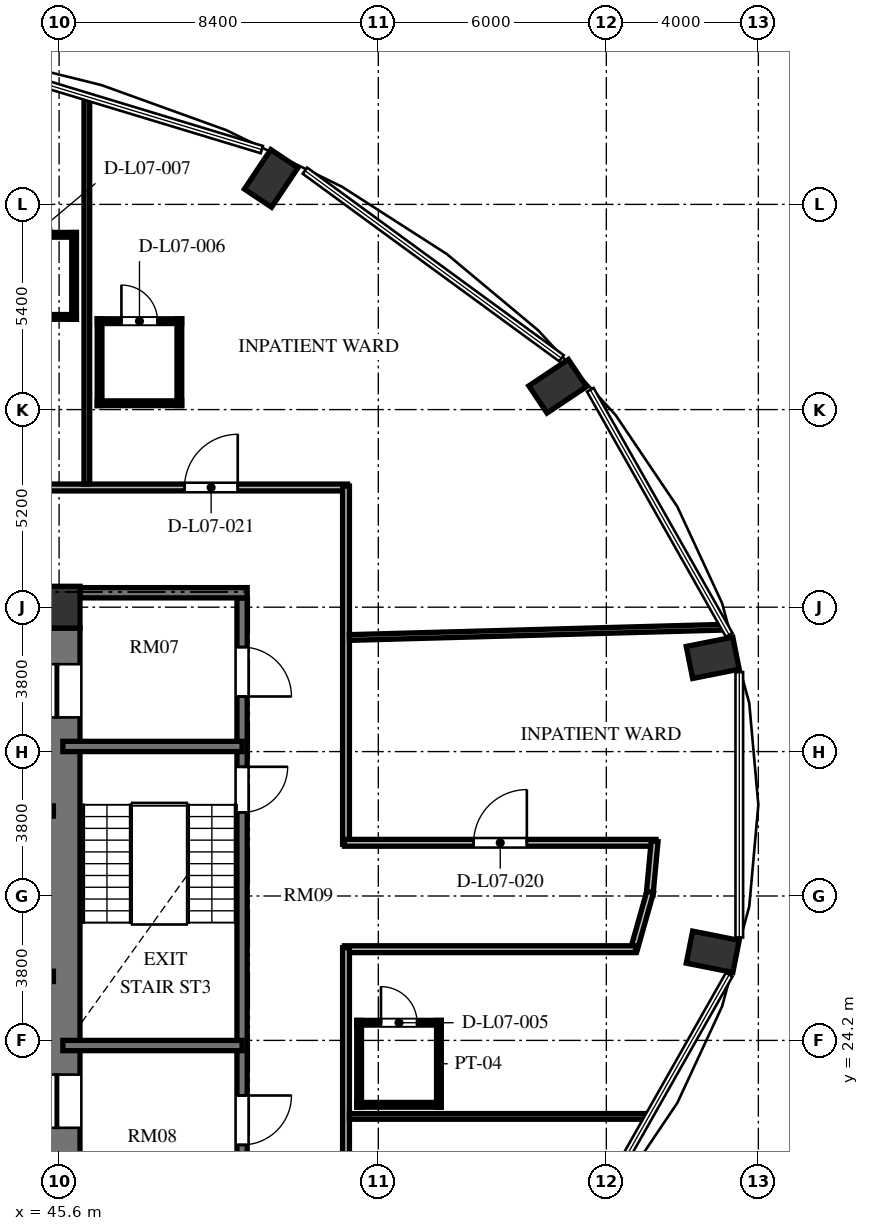
"""IFC4 building model, lengths in metres.
Left out: names, types, materials, properties, quantities, classifications, styles, units other than length and angle.
Written with IfcOpenShell. Run it as: python <this file> out.ifc"""

import sys

from ifc_helpers import new_model, si_unit, direction, frame, frame_2d, origin, origin_2d, place, context, subcontext, project, spatial, rectangle, extrude, element, fill, save


model = new_model("IFC4")
c1 = context("Model", 3, precision=1e-05, world=origin(), true_north=direction((0.0, 1.0)))
c2 = subcontext(c1, "Body", "Model", "MODEL_VIEW")
j1 = project(units=[si_unit("LENGTHUNIT", "METRE"), si_unit("PLANEANGLEUNIT", "RADIAN")], contexts=[c1])
p1 = place(None, origin())
s1 = spatial("IfcSite", under=j1, at=p1, CompositionType="ELEMENT")
p2 = place(p1, origin())
s2 = spatial("IfcBuilding", under=s1, at=p2, CompositionType="ELEMENT")
p3 = place(p2, frame((0.0, 0.0, 32.496)))
s3 = spatial("IfcBuildingStorey", under=s2, at=p3, CompositionType="ELEMENT", Elevation=32.496)
for number, where, z_axis, x_axis in (
    (1, (62.8, 26.532, 0.0), (0.0, 0.0, 1.0), (0.981, -0.195, 0.0)),
    (2, (62.8, 34.268, 0.0), (0.0, 0.0, 1.0), (0.981, 0.195, 0.0)),
    (3, (58.72, 41.414, 0.0), (0.0, 0.0, 1.0), (0.831, 0.556, 0.0)),
    (4, (51.181, 46.884, 0.0), (0.0, 0.0, 1.0), (0.556, 0.831, 0.0)),
):
    element("IfcColumn", number, at=place(p3, frame(where, z_axis=z_axis, x_axis=x_axis)), inside=s3, PredefinedType="COLUMN", context=c2, shape_type="SweptSolid", body=[
        extrude(rectangle(XDim=1.25, YDim=0.86, at=origin_2d()), origin(), (0.0, 0.0, 1.0), 3.648),
    ])
p4 = place(p3, frame((45.6, 35.6, 0.0), z_axis=(0.0, 0.0, 1.0), x_axis=(1.0, 0.0, 0.0)))
e5 = element("IfcColumn", 5, at=p4, inside=s3, PredefinedType="COLUMN", context=c2, shape_type="SweptSolid", body=[
    extrude(rectangle(XDim=1.1, YDim=1.1, at=origin_2d()), origin(), (0.0, 0.0, 1.0), 3.648),
])
p5 = place(p3, frame((45.7, 20.95, 0.0), z_axis=(0.0, 0.0, 1.0), x_axis=(0.0, 1.0, 0.0)))
e6 = element("IfcWall", 6, at=p5, inside=s3, PredefinedType="SHEAR", context=c2, shape_type="SweptSolid", body=[
    extrude(rectangle(XDim=14.1, YDim=0.9, at=frame_2d((7.05, 0.0))), origin(), (0.0, 0.0, 1.0), 3.648),
])
p6 = place(p5, frame((11.75, 0.0, 0.0)))
e7 = element("IfcOpeningElement", 7, at=p6, cuts=e6, PredefinedType="OPENING", context=c2, shape_type="SweptSolid", body=[
    extrude(rectangle(XDim=1.4, YDim=2.3, at=frame_2d((0.7, 1.15))), frame((0.0, 0.46, 0.0), z_axis=(0.0, -1.0, 0.0), x_axis=(1.0, 0.0, 0.0)), (0.0, 0.0, 1.0), 0.92),
])
p7 = place(p5, frame((0.95, 0.0, 0.0)))
e8 = element("IfcOpeningElement", 8, at=p7, cuts=e6, PredefinedType="OPENING", context=c2, shape_type="SweptSolid", body=[
    extrude(rectangle(XDim=1.4, YDim=2.3, at=frame_2d((0.7, 1.15))), frame((0.0, 0.46, 0.0), z_axis=(0.0, -1.0, 0.0), x_axis=(1.0, 0.0, 0.0)), (0.0, 0.0, 1.0), 0.92),
])
p8 = place(p3, frame((37.465, 30.235, 0.0), z_axis=(0.0, 0.0, 1.0), x_axis=(1.0, 0.0, 0.0)))
e9 = element("IfcWall", 9, at=p8, inside=s3, PredefinedType="SHEAR", context=c2, shape_type="SweptSolid", body=[
    extrude(rectangle(XDim=7.985, YDim=0.27, at=frame_2d((3.992, 0.0))), origin(), (0.0, 0.0, 1.0), 3.648),
])
p9 = place(p8, frame((6.455, 0.0, 0.0)))
e10 = element("IfcOpeningElement", 10, at=p9, cuts=e9, PredefinedType="OPENING", context=c2, shape_type="SweptSolid", body=[
    extrude(rectangle(XDim=1.2, YDim=2.15, at=frame_2d((0.6, 1.075))), frame((0.0, 0.145, 0.0), z_axis=(0.0, -1.0, 0.0), x_axis=(1.0, 0.0, 0.0)), (0.0, 0.0, 1.0), 0.29),
])
p10 = place(p3, frame((37.465, 25.885, 0.0), z_axis=(0.0, 0.0, 1.0), x_axis=(1.0, 0.0, 0.0)))
e11 = element("IfcWall", 11, at=p10, inside=s3, PredefinedType="SHEAR", context=c2, shape_type="SweptSolid", body=[
    extrude(rectangle(XDim=7.985, YDim=0.27, at=frame_2d((3.992, 0.0))), origin(), (0.0, 0.0, 1.0), 3.648),
])
p11 = place(p3, frame((50.415, 35.845, 0.0), z_axis=(0.0, 0.0, 1.0), x_axis=(0.0, -1.0, 0.0)))
e12 = element("IfcWall", 12, at=p11, inside=s3, PredefinedType="SHEAR", context=c2, shape_type="SweptSolid", body=[
    extrude(rectangle(XDim=15.825, YDim=0.27, at=frame_2d((7.913, 0.0))), origin(), (0.0, 0.0, 1.0), 3.648),
])
p12 = place(p11, frame((4.445, 0.0, 0.0)))
e13 = element("IfcOpeningElement", 13, at=p12, cuts=e12, PredefinedType="OPENING", context=c2, shape_type="SweptSolid", body=[
    extrude(rectangle(XDim=1.2, YDim=2.15, at=frame_2d((0.6, 1.075))), frame((0.0, 0.145, 0.0), z_axis=(0.0, -1.0, 0.0), x_axis=(1.0, 0.0, 0.0)), (0.0, 0.0, 1.0), 0.29),
])
p13 = place(p11, frame((1.295, 0.0, 0.0)))
e14 = element("IfcOpeningElement", 14, at=p13, cuts=e12, PredefinedType="OPENING", context=c2, shape_type="SweptSolid", body=[
    extrude(rectangle(XDim=1.3, YDim=2.2, at=frame_2d((0.65, 1.1))), frame((0.0, 0.145, 0.0), z_axis=(0.0, -1.0, 0.0), x_axis=(1.0, 0.0, 0.0)), (0.0, 0.0, 1.0), 0.29),
])
p14 = place(p11, frame((13.095, 0.0, 0.0)))
e15 = element("IfcOpeningElement", 15, at=p14, cuts=e12, PredefinedType="OPENING", context=c2, shape_type="SweptSolid", body=[
    extrude(rectangle(XDim=1.3, YDim=2.2, at=frame_2d((0.65, 1.1))), frame((0.0, 0.145, 0.0), z_axis=(0.0, -1.0, 0.0), x_axis=(1.0, 0.0, 0.0)), (0.0, 0.0, 1.0), 0.29),
])
p15 = place(p3, frame((46.15, 35.98, 0.0), z_axis=(0.0, 0.0, 1.0), x_axis=(1.0, 0.0, 0.0)))
e16 = element("IfcWall", 16, at=p15, inside=s3, PredefinedType="SHEAR", context=c2, shape_type="SweptSolid", body=[
    extrude(rectangle(XDim=4.4, YDim=0.27, at=frame_2d((2.2, 0.0))), origin(), (0.0, 0.0, 1.0), 3.648),
])
for number, where, z_axis, x_axis in (
    (17, (45.7, 31.935, 0.0), (0.0, 0.0, 1.0), (1.0, 0.0, 0.0)),
    (18, (45.7, 24.065, 0.0), (0.0, 0.0, 1.0), (1.0, 0.0, 0.0)),
):
    element("IfcWall", number, at=place(p3, frame(where, z_axis=z_axis, x_axis=x_axis)), inside=s3, PredefinedType="SHEAR", context=c2, shape_type="SweptSolid", body=[
        extrude(rectangle(XDim=4.715, YDim=0.27, at=frame_2d((2.357, 0.0))), origin(), (0.0, 0.0, 1.0), 3.648),
    ])
p16 = place(p3, frame((23.31, 38.75, 0.0), z_axis=(0.0, 0.0, 1.0), x_axis=(1.0, 0.0, 0.0)))
e19 = element("IfcWall", 19, at=p16, inside=s3, PredefinedType="PARTITIONING", context=c2, shape_type="SweptSolid", body=[
    extrude(rectangle(XDim=29.88, YDim=0.18, at=frame_2d((14.94, 0.0))), origin(), (0.0, 0.0, 1.0), 3.053),
])
p17 = place(p16, frame((25.591, 0.0, 0.0)))
e20 = element("IfcOpeningElement", 20, at=p17, cuts=e19, PredefinedType="OPENING", context=c2, shape_type="SweptSolid", body=[
    extrude(rectangle(XDim=1.4, YDim=2.2, at=frame_2d((0.7, 1.1))), frame((0.0, 0.1, 0.0), z_axis=(0.0, -1.0, 0.0), x_axis=(1.0, 0.0, 0.0)), (0.0, 0.0, 1.0), 0.2),
])
p18 = place(p16, frame((20.24, 0.0, 0.0)))
e21 = element("IfcOpeningElement", 21, at=p18, cuts=e19, PredefinedType="OPENING", context=c2, shape_type="SweptSolid", body=[
    extrude(rectangle(XDim=1.4, YDim=2.2, at=frame_2d((0.7, 1.1))), frame((0.0, 0.1, 0.0), z_axis=(0.0, -1.0, 0.0), x_axis=(1.0, 0.0, 0.0)), (0.0, 0.0, 1.0), 0.2),
])
p19 = place(p16, frame((16.075, 0.0, 0.0)))
e22 = element("IfcOpeningElement", 22, at=p19, cuts=e19, PredefinedType="OPENING", context=c2, shape_type="SweptSolid", body=[
    extrude(rectangle(XDim=1.4, YDim=2.2, at=frame_2d((0.7, 1.1))), frame((0.0, 0.1, 0.0), z_axis=(0.0, -1.0, 0.0), x_axis=(1.0, 0.0, 0.0)), (0.0, 0.0, 1.0), 0.2),
])
p20 = place(p16, frame((11.905, 0.0, 0.0)))
e23 = element("IfcOpeningElement", 23, at=p20, cuts=e19, PredefinedType="OPENING", context=c2, shape_type="SweptSolid", body=[
    extrude(rectangle(XDim=1.4, YDim=2.2, at=frame_2d((0.7, 1.1))), frame((0.0, 0.1, 0.0), z_axis=(0.0, -1.0, 0.0), x_axis=(1.0, 0.0, 0.0)), (0.0, 0.0, 1.0), 0.2),
])
p21 = place(p16, frame((7.74, 0.0, 0.0)))
e24 = element("IfcOpeningElement", 24, at=p21, cuts=e19, PredefinedType="OPENING", context=c2, shape_type="SweptSolid", body=[
    extrude(rectangle(XDim=1.4, YDim=2.2, at=frame_2d((0.7, 1.1))), frame((0.0, 0.1, 0.0), z_axis=(0.0, -1.0, 0.0), x_axis=(1.0, 0.0, 0.0)), (0.0, 0.0, 1.0), 0.2),
])
p22 = place(p16, frame((2.639, 0.0, 0.0)))
e25 = element("IfcOpeningElement", 25, at=p22, cuts=e19, PredefinedType="OPENING", context=c2, shape_type="SweptSolid", body=[
    extrude(rectangle(XDim=1.4, YDim=2.2, at=frame_2d((0.7, 1.1))), frame((0.0, 0.1, 0.0), z_axis=(0.0, -1.0, 0.0), x_axis=(1.0, 0.0, 0.0)), (0.0, 0.0, 1.0), 0.2),
])
p23 = place(p3, frame((53.15, 38.79, 0.0), z_axis=(0.0, 0.0, 1.0), x_axis=(0.0, -1.0, 0.0)))
e26 = element("IfcWall", 26, at=p23, inside=s3, PredefinedType="PARTITIONING", context=c2, shape_type="SweptSolid", body=[
    extrude(rectangle(XDim=9.43, YDim=0.18, at=frame_2d((4.715, 0.0))), origin(), (0.0, 0.0, 1.0), 3.428),
])
p24 = place(p3, frame((53.11, 29.4, 0.0), z_axis=(0.0, 0.0, 1.0), x_axis=(1.0, 0.0, 0.0)))
e27 = element("IfcWall", 27, at=p24, inside=s3, PredefinedType="PARTITIONING", context=c2, shape_type="SweptSolid", body=[
    extrude(rectangle(XDim=8.197, YDim=0.18, at=frame_2d((4.098, 0.0))), origin(), (0.0, 0.0, 1.0), 3.428),
])
p25 = place(p24, frame((3.398, 0.0, 0.0)))
e28 = element("IfcOpeningElement", 28, at=p25, cuts=e27, PredefinedType="OPENING", context=c2, shape_type="SweptSolid", body=[
    extrude(rectangle(XDim=1.4, YDim=2.2, at=frame_2d((0.7, 1.1))), frame((0.0, 0.1, 0.0), z_axis=(0.0, -1.0, 0.0), x_axis=(1.0, 0.0, 0.0)), (0.0, 0.0, 1.0), 0.2),
])
p26 = place(p3, frame((61.271, 29.44, 0.0), z_axis=(0.0, 0.0, 1.0), x_axis=(-0.092539930621, -0.995708974169, 0.0)))
e29 = element("IfcWall", 29, at=p26, inside=s3, PredefinedType="PARTITIONING", context=c2, shape_type="SweptSolid", body=[
    extrude(rectangle(XDim=1.417, YDim=0.18, at=frame_2d((0.708, 0.0))), origin(), (0.0, 0.0, 1.0), 3.428),
])
p27 = place(p3, frame((61.154, 28.107, 0.0), z_axis=(0.0, 0.0, 1.0), x_axis=(-0.271748942561, -0.962368179138, 0.0)))
e30 = element("IfcWall", 30, at=p27, inside=s3, PredefinedType="PARTITIONING", context=c2, shape_type="SweptSolid", body=[
    extrude(rectangle(XDim=1.606, YDim=0.18, at=frame_2d((0.803, 0.0))), origin(), (0.0, 0.0, 1.0), 3.428),
])
p28 = place(p3, frame((60.768, 26.6, 0.0), z_axis=(0.0, 0.0, 1.0), x_axis=(-1.0, 0.0, 0.0)))
e31 = element("IfcWall", 31, at=p28, inside=s3, PredefinedType="PARTITIONING", context=c2, shape_type="SweptSolid", body=[
    extrude(rectangle(XDim=7.658, YDim=0.18, at=frame_2d((3.829, 0.0))), origin(), (0.0, 0.0, 1.0), 3.428),
])
p29 = place(p3, frame((53.15, 26.64, 0.0), z_axis=(0.0, 0.0, 1.0), x_axis=(0.0, -1.0, 0.0)))
e32 = element("IfcWall", 32, at=p29, inside=s3, PredefinedType="PARTITIONING", context=c2, shape_type="SweptSolid", body=[
    extrude(rectangle(XDim=6.66, YDim=0.18, at=frame_2d((3.33, 0.0))), origin(), (0.0, 0.0, 1.0), 3.428),
])
p30 = place(p3, frame((53.24, 22.2, 0.0), z_axis=(0.0, 0.0, 1.0), x_axis=(1.0, 0.0, 0.0)))
e33 = element("IfcWall", 33, at=p30, inside=s3, PredefinedType="PARTITIONING", context=c2, shape_type="SweptSolid", body=[
    extrude(rectangle(XDim=7.875, YDim=0.15, at=frame_2d((3.938, 0.0))), origin(), (0.0, 0.0, 1.0), 3.428),
])
p31 = place(p3, frame((53.24, 34.802, 0.0), z_axis=(0.0, 0.0, 1.0), x_axis=(0.999620561748, 0.027545099924, 0.0)))
e34 = element("IfcWall", 34, at=p31, inside=s3, PredefinedType="PARTITIONING", context=c2, shape_type="SweptSolid", body=[
    extrude(rectangle(XDim=9.891, YDim=0.15, at=frame_2d((4.946, 0.0))), origin(), (0.0, 0.0, 1.0), 2.813),
])
p32 = place(p3, frame((46.33, 38.84, 0.0), z_axis=(0.0, 0.0, 1.0), x_axis=(0.0, 1.0, 0.0)))
e35 = element("IfcWall", 35, at=p32, inside=s3, PredefinedType="PARTITIONING", context=c2, shape_type="SweptSolid", body=[
    extrude(rectangle(XDim=10.185, YDim=0.15, at=frame_2d((5.092, 0.0))), origin(), (0.0, 0.0, 1.0), 3.428),
])
p33 = place(p3, frame((53.435, 24.665, 0.0), z_axis=(0.0, 0.0, 1.0), x_axis=(1.0, 0.0, 0.0)))
e36 = element("IfcWall", 36, at=p33, inside=s3, PredefinedType="PARTITIONING", context=c2, shape_type="SweptSolid", body=[
    extrude(rectangle(XDim=2.22, YDim=0.125, at=frame_2d((1.11, 0.0))), origin(), (0.0, 0.0, 1.0), 3.428),
])
p34 = place(p33, frame((0.635, 0.0, 0.0)))
e37 = element("IfcOpeningElement", 37, at=p34, cuts=e36, PredefinedType="OPENING", context=c2, shape_type="SweptSolid", body=[
    extrude(rectangle(XDim=0.95, YDim=2.1, at=frame_2d((0.475, 1.05))), frame((0.0, 0.073, 0.0), z_axis=(0.0, -1.0, 0.0), x_axis=(1.0, 0.0, 0.0)), (0.0, 0.0, 1.0), 0.145),
])
p35 = place(p3, frame((53.435, 22.505, 0.0), z_axis=(0.0, 0.0, 1.0), x_axis=(1.0, 0.0, 0.0)))
e38 = element("IfcWall", 38, at=p35, inside=s3, PredefinedType="PARTITIONING", context=c2, shape_type="SweptSolid", body=[
    extrude(rectangle(XDim=2.22, YDim=0.125, at=frame_2d((1.11, 0.0))), origin(), (0.0, 0.0, 1.0), 3.428),
])
for number, where, z_axis, x_axis in (
    (39, (55.595, 22.445, 0.0), (0.0, 0.0, 1.0), (0.0, 1.0, 0.0)),
    (40, (53.495, 22.445, 0.0), (0.0, 0.0, 1.0), (0.0, 1.0, 0.0)),
):
    element("IfcWall", number, at=place(p3, frame(where, z_axis=z_axis, x_axis=x_axis)), inside=s3, PredefinedType="PARTITIONING", context=c2, shape_type="SweptSolid", body=[
        extrude(rectangle(XDim=2.28, YDim=0.125, at=frame_2d((1.14, 0.0))), origin(), (0.0, 0.0, 1.0), 3.428),
    ])
p36 = place(p3, frame((46.605, 43.127, 0.0), z_axis=(0.0, 0.0, 1.0), x_axis=(1.0, 0.0, 0.0)))
e41 = element("IfcWall", 41, at=p36, inside=s3, PredefinedType="PARTITIONING", context=c2, shape_type="SweptSolid", body=[
    extrude(rectangle(XDim=2.22, YDim=0.125, at=frame_2d((1.11, 0.0))), origin(), (0.0, 0.0, 1.0), 3.428),
])
p37 = place(p36, frame((0.635, 0.0, 0.0)))
e42 = element("IfcOpeningElement", 42, at=p37, cuts=e41, PredefinedType="OPENING", context=c2, shape_type="SweptSolid", body=[
    extrude(rectangle(XDim=0.95, YDim=2.1, at=frame_2d((0.475, 1.05))), frame((0.0, 0.073, 0.0), z_axis=(0.0, -1.0, 0.0), x_axis=(1.0, 0.0, 0.0)), (0.0, 0.0, 1.0), 0.145),
])
p38 = place(p3, frame((46.605, 40.967, 0.0), z_axis=(0.0, 0.0, 1.0), x_axis=(1.0, 0.0, 0.0)))
e43 = element("IfcWall", 43, at=p38, inside=s3, PredefinedType="PARTITIONING", context=c2, shape_type="SweptSolid", body=[
    extrude(rectangle(XDim=2.22, YDim=0.125, at=frame_2d((1.11, 0.0))), origin(), (0.0, 0.0, 1.0), 3.428),
])
for number, where, z_axis, x_axis in (
    (44, (48.765, 40.907, 0.0), (0.0, 0.0, 1.0), (0.0, 1.0, 0.0)),
    (45, (46.665, 40.907, 0.0), (0.0, 0.0, 1.0), (0.0, 1.0, 0.0)),
):
    element("IfcWall", number, at=place(p3, frame(where, z_axis=z_axis, x_axis=x_axis)), inside=s3, PredefinedType="PARTITIONING", context=c2, shape_type="SweptSolid", body=[
        extrude(rectangle(XDim=2.28, YDim=0.125, at=frame_2d((1.14, 0.0))), origin(), (0.0, 0.0, 1.0), 3.428),
    ])
p39 = place(p3, frame((43.835, 45.399, 0.0), z_axis=(0.0, 0.0, 1.0), x_axis=(1.0, 0.0, 0.0)))
e46 = element("IfcWall", 46, at=p39, inside=s3, PredefinedType="PARTITIONING", context=c2, shape_type="SweptSolid", body=[
    extrude(rectangle(XDim=2.22, YDim=0.125, at=frame_2d((1.11, 0.0))), origin(), (0.0, 0.0, 1.0), 3.013),
])
p40 = place(p39, frame((0.635, 0.0, 0.0)))
e47 = element("IfcOpeningElement", 47, at=p40, cuts=e46, PredefinedType="OPENING", context=c2, shape_type="SweptSolid", body=[
    extrude(rectangle(XDim=0.95, YDim=2.1, at=frame_2d((0.475, 1.05))), frame((0.0, 0.073, 0.0), z_axis=(0.0, -1.0, 0.0), x_axis=(1.0, 0.0, 0.0)), (0.0, 0.0, 1.0), 0.145),
])
p41 = place(p3, frame((43.835, 43.239, 0.0), z_axis=(0.0, 0.0, 1.0), x_axis=(1.0, 0.0, 0.0)))
e48 = element("IfcWall", 48, at=p41, inside=s3, PredefinedType="PARTITIONING", context=c2, shape_type="SweptSolid", body=[
    extrude(rectangle(XDim=2.22, YDim=0.125, at=frame_2d((1.11, 0.0))), origin(), (0.0, 0.0, 1.0), 3.053),
])
p42 = place(p3, frame((45.995, 43.179, 0.0), z_axis=(0.0, 0.0, 1.0), x_axis=(0.0, 1.0, 0.0)))
e49 = element("IfcWall", 49, at=p42, inside=s3, PredefinedType="PARTITIONING", context=c2, shape_type="SweptSolid", body=[
    extrude(rectangle(XDim=2.28, YDim=0.125, at=frame_2d((1.14, 0.0))), origin(), (0.0, 0.0, 1.0), 3.428),
])
p43 = place(p6, origin())
e50 = element("IfcDoor", 50, at=p43, inside=s3, OperationType="SLIDING_TO_LEFT", PredefinedType="DOOR", context=c2, shape_type="SweptSolid", body=[
    extrude(rectangle(XDim=1.4, YDim=2.3, at=frame_2d((0.7, 1.15))), frame((0.0, 0.025, 0.0), z_axis=(0.0, -1.0, 0.0), x_axis=(1.0, 0.0, 0.0)), (0.0, 0.0, 1.0), 0.05),
])
fill(e7, e50)
p44 = place(p7, origin())
e51 = element("IfcDoor", 51, at=p44, inside=s3, OperationType="SLIDING_TO_LEFT", PredefinedType="DOOR", context=c2, shape_type="SweptSolid", body=[
    extrude(rectangle(XDim=1.4, YDim=2.3, at=frame_2d((0.7, 1.15))), frame((0.0, 0.025, 0.0), z_axis=(0.0, -1.0, 0.0), x_axis=(1.0, 0.0, 0.0)), (0.0, 0.0, 1.0), 0.05),
])
fill(e8, e51)
p45 = place(p12, origin())
e52 = element("IfcDoor", 52, at=p45, inside=s3, OperationType="SINGLE_SWING_LEFT", PredefinedType="DOOR", context=c2, shape_type="SweptSolid", body=[
    extrude(rectangle(XDim=1.2, YDim=2.15, at=frame_2d((0.6, 1.075))), frame((0.0, 0.025, 0.0), z_axis=(0.0, -1.0, 0.0), x_axis=(1.0, 0.0, 0.0)), (0.0, 0.0, 1.0), 0.05),
])
fill(e13, e52)
p46 = place(p13, origin())
e53 = element("IfcDoor", 53, at=p46, inside=s3, OperationType="SINGLE_SWING_RIGHT", PredefinedType="DOOR", context=c2, shape_type="SweptSolid", body=[
    extrude(rectangle(XDim=1.3, YDim=2.2, at=frame_2d((0.65, 1.1))), frame((0.0, 0.025, 0.0), z_axis=(0.0, -1.0, 0.0), x_axis=(1.0, 0.0, 0.0)), (0.0, 0.0, 1.0), 0.05),
])
fill(e14, e53)
p47 = place(p14, origin())
e54 = element("IfcDoor", 54, at=p47, inside=s3, OperationType="SINGLE_SWING_LEFT", PredefinedType="DOOR", context=c2, shape_type="SweptSolid", body=[
    extrude(rectangle(XDim=1.3, YDim=2.2, at=frame_2d((0.65, 1.1))), frame((0.0, 0.025, 0.0), z_axis=(0.0, -1.0, 0.0), x_axis=(1.0, 0.0, 0.0)), (0.0, 0.0, 1.0), 0.05),
])
fill(e15, e54)
p48 = place(p34, origin())
e55 = element("IfcDoor", 55, at=p48, inside=s3, OperationType="SINGLE_SWING_LEFT", PredefinedType="DOOR", context=c2, shape_type="SweptSolid", body=[
    extrude(rectangle(XDim=0.95, YDim=2.1, at=frame_2d((0.475, 1.05))), frame((0.0, 0.025, 0.0), z_axis=(0.0, -1.0, 0.0), x_axis=(1.0, 0.0, 0.0)), (0.0, 0.0, 1.0), 0.05),
])
fill(e37, e55)
p49 = place(p25, origin())
e56 = element("IfcDoor", 56, at=p49, inside=s3, OperationType="SINGLE_SWING_RIGHT", PredefinedType="DOOR", context=c2, shape_type="SweptSolid", body=[
    extrude(rectangle(XDim=1.4, YDim=2.2, at=frame_2d((0.7, 1.1))), frame((0.0, 0.025, 0.0), z_axis=(0.0, -1.0, 0.0), x_axis=(1.0, 0.0, 0.0)), (0.0, 0.0, 1.0), 0.05),
])
fill(e28, e56)
p50 = place(p37, origin())
e57 = element("IfcDoor", 57, at=p50, inside=s3, OperationType="SINGLE_SWING_LEFT", PredefinedType="DOOR", context=c2, shape_type="SweptSolid", body=[
    extrude(rectangle(XDim=0.95, YDim=2.1, at=frame_2d((0.475, 1.05))), frame((0.0, 0.025, 0.0), z_axis=(0.0, -1.0, 0.0), x_axis=(1.0, 0.0, 0.0)), (0.0, 0.0, 1.0), 0.05),
])
fill(e42, e57)
p51 = place(p17, origin())
e58 = element("IfcDoor", 58, at=p51, inside=s3, OperationType="SINGLE_SWING_RIGHT", PredefinedType="DOOR", context=c2, shape_type="SweptSolid", body=[
    extrude(rectangle(XDim=1.4, YDim=2.2, at=frame_2d((0.7, 1.1))), frame((0.0, 0.025, 0.0), z_axis=(0.0, -1.0, 0.0), x_axis=(1.0, 0.0, 0.0)), (0.0, 0.0, 1.0), 0.05),
])
fill(e20, e58)
p52 = place(p40, origin())
e59 = element("IfcDoor", 59, at=p52, inside=s3, OperationType="SINGLE_SWING_LEFT", PredefinedType="DOOR", context=c2, shape_type="SweptSolid", body=[
    extrude(rectangle(XDim=0.95, YDim=2.1, at=frame_2d((0.475, 1.05))), frame((0.0, 0.025, 0.0), z_axis=(0.0, -1.0, 0.0), x_axis=(1.0, 0.0, 0.0)), (0.0, 0.0, 1.0), 0.05),
])
fill(e47, e59)
save(model, sys.argv[1])
